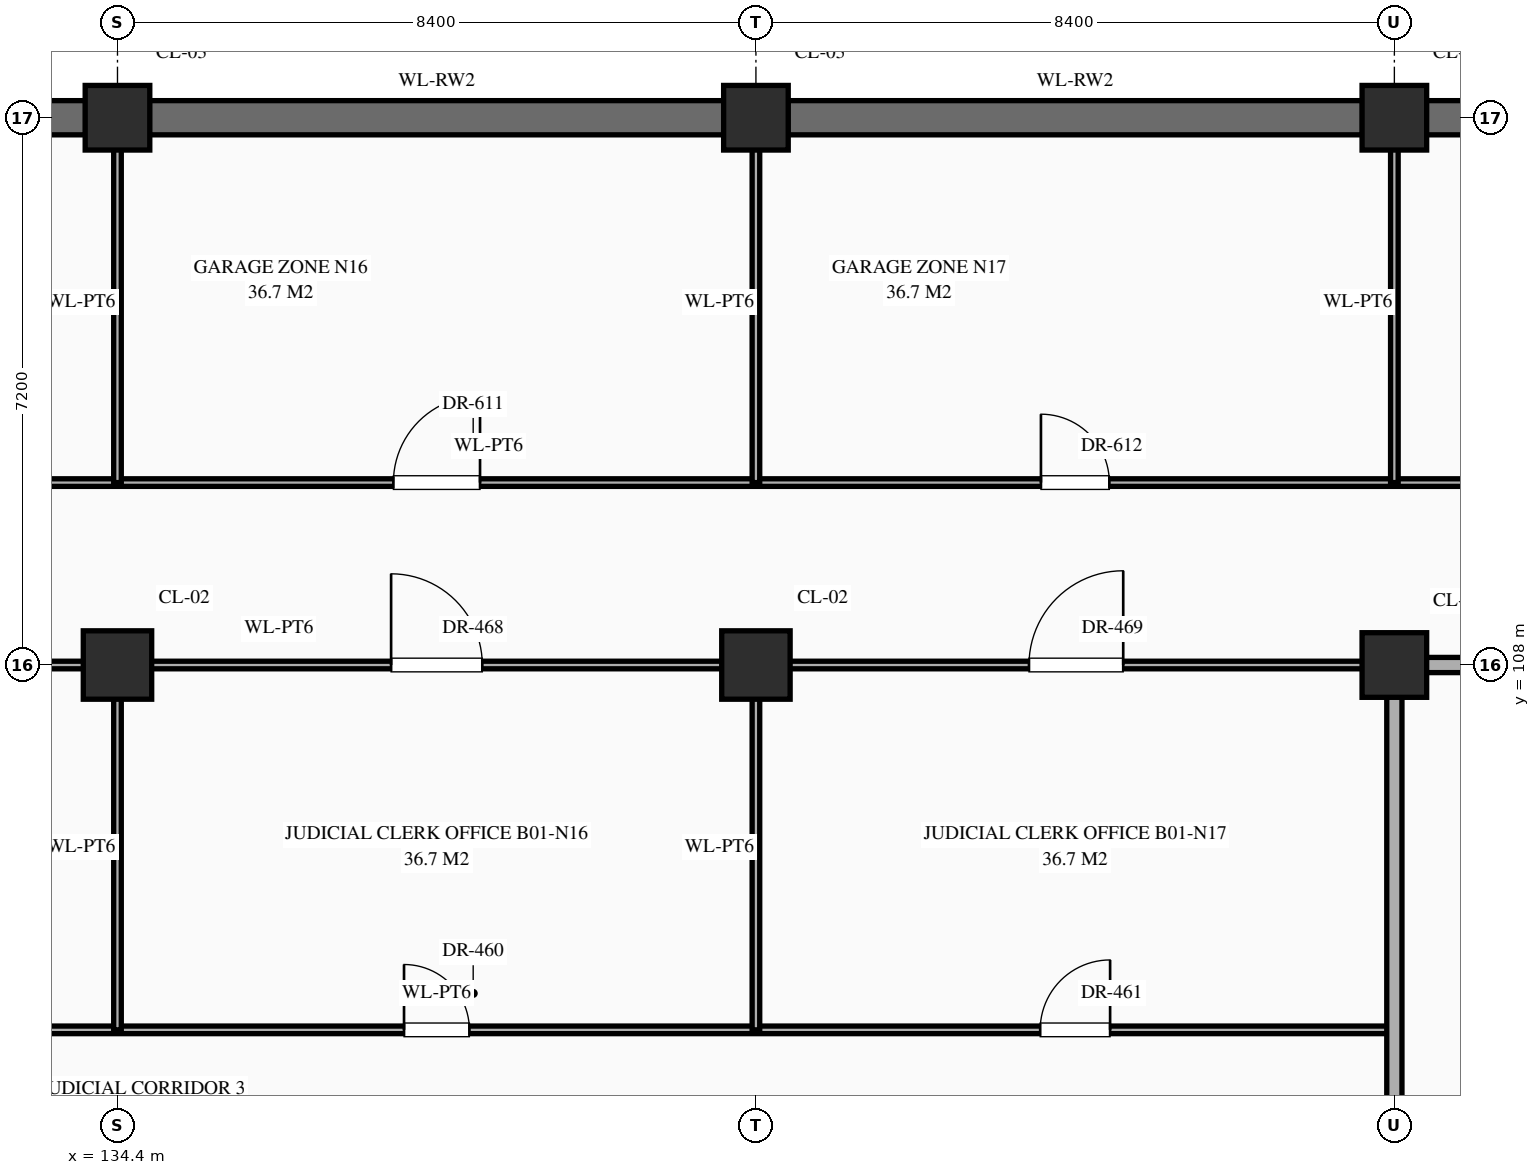
"""IFC4 building model, lengths in metres.
Left out: names, types, materials, properties, quantities, classifications, styles, units other than length and angle.
Written with IfcOpenShell. Run it as: python <this file> out.ifc"""

import sys

from ifc_helpers import new_model, si_unit, direction, frame, frame_2d, origin, origin_2d, place, context, subcontext, project, spatial, rectangle, extrude, element, fill, save


model = new_model("IFC4")
c1 = context("Model", 3, precision=1e-05, world=origin(), true_north=direction((0.0, 1.0)))
c2 = subcontext(c1, "Body", "Model", "MODEL_VIEW")
j1 = project(units=[si_unit("LENGTHUNIT", "METRE"), si_unit("PLANEANGLEUNIT", "RADIAN")], contexts=[c1])
p1 = place(None, origin())
s1 = spatial("IfcSite", under=j1, at=p1, CompositionType="ELEMENT")
p2 = place(p1, origin())
s2 = spatial("IfcBuilding", under=s1, at=p2, CompositionType="ELEMENT")
p3 = place(p2, frame((0.0, 0.0, -5.4)))
s3 = spatial("IfcBuildingStorey", under=s2, at=p3, CompositionType="ELEMENT", Elevation=-5.4)
p4 = place(p3, frame((134.4, 108.0, 0.0), z_axis=(0.0, 0.0, 1.0), x_axis=(1.0, 0.0, 0.0)))
e1 = element("IfcColumn", 1, at=p4, inside=s3, PredefinedType="COLUMN", context=c2, shape_type="SweptSolid", body=[
    extrude(rectangle(XDim=0.9, YDim=0.9, at=origin_2d()), origin(), (0.0, 0.0, 1.0), 5.4),
])
p5 = place(p3, frame((134.4, 115.2, 0.0), z_axis=(0.0, 0.0, 1.0), x_axis=(1.0, 0.0, 0.0)))
e2 = element("IfcColumn", 2, at=p5, inside=s3, PredefinedType="COLUMN", context=c2, shape_type="SweptSolid", body=[
    extrude(rectangle(XDim=0.85, YDim=0.85, at=origin_2d()), origin(), (0.0, 0.0, 1.0), 5.4),
])
p6 = place(p3, frame((142.8, 108.0, 0.0), z_axis=(0.0, 0.0, 1.0), x_axis=(1.0, 0.0, 0.0)))
e3 = element("IfcColumn", 3, at=p6, inside=s3, PredefinedType="COLUMN", context=c2, shape_type="SweptSolid", body=[
    extrude(rectangle(XDim=0.9, YDim=0.9, at=origin_2d()), origin(), (0.0, 0.0, 1.0), 5.4),
])
for number, where, z_axis, x_axis in (
    (4, (142.8, 115.2, 0.0), (0.0, 0.0, 1.0), (1.0, 0.0, 0.0)),
    (5, (151.2, 108.0, 0.0), (0.0, 0.0, 1.0), (1.0, 0.0, 0.0)),
    (6, (151.2, 115.2, 0.0), (0.0, 0.0, 1.0), (1.0, 0.0, 0.0)),
):
    element("IfcColumn", number, at=place(p3, frame(where, z_axis=z_axis, x_axis=x_axis)), inside=s3, PredefinedType="COLUMN", context=c2, shape_type="SweptSolid", body=[
        extrude(rectangle(XDim=0.85, YDim=0.85, at=origin_2d()), origin(), (0.0, 0.0, 1.0), 5.4),
    ])
p7 = place(p3, frame((126.42, 115.2, 0.0), z_axis=(0.0, 0.0, 1.0), x_axis=(1.0, 0.0, 0.0)))
e7 = element("IfcWall", 7, at=p7, inside=s3, PredefinedType="USERDEFINED", context=c2, shape_type="SweptSolid", body=[
    extrude(rectangle(XDim=7.56, YDim=0.45, at=frame_2d((3.78, 0.0))), origin(), (0.0, 0.0, 1.0), 4.98),
])
p8 = place(p3, frame((134.82, 115.2, 0.0), z_axis=(0.0, 0.0, 1.0), x_axis=(1.0, 0.0, 0.0)))
e8 = element("IfcWall", 8, at=p8, inside=s3, PredefinedType="USERDEFINED", context=c2, shape_type="SweptSolid", body=[
    extrude(rectangle(XDim=7.56, YDim=0.45, at=frame_2d((3.78, 0.0))), origin(), (0.0, 0.0, 1.0), 4.98),
])
p9 = place(p3, frame((143.22, 115.2, 0.0), z_axis=(0.0, 0.0, 1.0), x_axis=(1.0, 0.0, 0.0)))
e9 = element("IfcWall", 9, at=p9, inside=s3, PredefinedType="USERDEFINED", context=c2, shape_type="SweptSolid", body=[
    extrude(rectangle(XDim=7.56, YDim=0.45, at=frame_2d((3.78, 0.0))), origin(), (0.0, 0.0, 1.0), 4.98),
])
p10 = place(p3, frame((151.62, 115.2, 0.0), z_axis=(0.0, 0.0, 1.0), x_axis=(1.0, 0.0, 0.0)))
e10 = element("IfcWall", 10, at=p10, inside=s3, PredefinedType="USERDEFINED", context=c2, shape_type="SweptSolid", body=[
    extrude(rectangle(XDim=7.56, YDim=0.45, at=frame_2d((3.78, 0.0))), origin(), (0.0, 0.0, 1.0), 4.98),
])
p11 = place(p3, frame((126.0, 103.2, 0.0), z_axis=(0.0, 0.0, 1.0), x_axis=(1.0, 0.0, 0.0)))
e11 = element("IfcWall", 11, at=p11, inside=s3, PredefinedType="STANDARD", context=c2, shape_type="SweptSolid", body=[
    extrude(rectangle(XDim=25.2, YDim=0.1, at=frame_2d((12.6, 0.0))), origin(), (0.0, 0.0, 1.0), 5.1),
])
p12 = place(p11, frame((3.75, 0.0, 0.0)))
e12 = element("IfcOpeningElement", 12, at=p12, cuts=e11, PredefinedType="OPENING", context=c2, shape_type="SweptSolid", body=[
    extrude(rectangle(XDim=0.9, YDim=2.15, at=frame_2d((0.45, 1.075))), frame((0.0, 0.062, 0.0), z_axis=(0.0, -1.0, 0.0), x_axis=(1.0, 0.0, 0.0)), (0.0, 0.0, 1.0), 0.124),
])
p13 = place(p11, frame((12.17, 0.0, 0.0)))
e13 = element("IfcOpeningElement", 13, at=p13, cuts=e11, PredefinedType="OPENING", context=c2, shape_type="SweptSolid", body=[
    extrude(rectangle(XDim=0.86, YDim=2.1, at=frame_2d((0.43, 1.05))), frame((0.0, 0.062, 0.0), z_axis=(0.0, -1.0, 0.0), x_axis=(1.0, 0.0, 0.0)), (0.0, 0.0, 1.0), 0.124),
])
p14 = place(p11, frame((20.54, 0.0, 0.0)))
e14 = element("IfcOpeningElement", 14, at=p14, cuts=e11, PredefinedType="OPENING", context=c2, shape_type="SweptSolid", body=[
    extrude(rectangle(XDim=0.92, YDim=2.15, at=frame_2d((0.46, 1.075))), frame((0.0, 0.062, 0.0), z_axis=(0.0, -1.0, 0.0), x_axis=(1.0, 0.0, 0.0)), (0.0, 0.0, 1.0), 0.124),
])
p15 = place(p3, frame((126.0, 108.0, 0.0), z_axis=(0.0, 0.0, 1.0), x_axis=(1.0, 0.0, 0.0)))
e15 = element("IfcWall", 15, at=p15, inside=s3, PredefinedType="STANDARD", context=c2, shape_type="SweptSolid", body=[
    extrude(rectangle(XDim=25.2, YDim=0.1, at=frame_2d((12.6, 0.0))), origin(), (0.0, 0.0, 1.0), 4.13),
])
p16 = place(p15, frame((3.62, 0.0, 0.0)))
e16 = element("IfcOpeningElement", 16, at=p16, cuts=e15, PredefinedType="OPENING", context=c2, shape_type="SweptSolid", body=[
    extrude(rectangle(XDim=1.16, YDim=2.3, at=frame_2d((0.58, 1.15))), frame((0.0, 0.062, 0.0), z_axis=(0.0, -1.0, 0.0), x_axis=(1.0, 0.0, 0.0)), (0.0, 0.0, 1.0), 0.124),
])
p17 = place(p15, frame((12.0, 0.0, 0.0)))
e17 = element("IfcOpeningElement", 17, at=p17, cuts=e15, PredefinedType="OPENING", context=c2, shape_type="SweptSolid", body=[
    extrude(rectangle(XDim=1.2, YDim=2.35, at=frame_2d((0.6, 1.175))), frame((0.0, 0.062, 0.0), z_axis=(0.0, -1.0, 0.0), x_axis=(1.0, 0.0, 0.0)), (0.0, 0.0, 1.0), 0.124),
])
p18 = place(p15, frame((20.393, 0.0, 0.0)))
e18 = element("IfcOpeningElement", 18, at=p18, cuts=e15, PredefinedType="OPENING", context=c2, shape_type="SweptSolid", body=[
    extrude(rectangle(XDim=1.24, YDim=2.3, at=frame_2d((0.62, 1.15))), frame((0.0, 0.062, 0.0), z_axis=(0.0, -1.0, 0.0), x_axis=(1.0, 0.0, 0.0)), (0.0, 0.0, 1.0), 0.124),
])
p19 = place(p3, frame((151.2, 108.0, 0.0), z_axis=(0.0, 0.0, 1.0), x_axis=(1.0, 0.0, 0.0)))
e19 = element("IfcWall", 19, at=p19, inside=s3, PredefinedType="STANDARD", context=c2, shape_type="SweptSolid", body=[
    extrude(rectangle(XDim=6.6, YDim=0.2, at=frame_2d((3.3, 0.0))), origin(), (0.0, 0.0, 1.0), 4.13),
])
p20 = place(p3, frame((0.04, 110.4, 0.0), z_axis=(0.0, 0.0, 1.0), x_axis=(1.0, 0.0, 0.0)))
e20 = element("IfcWall", 20, at=p20, inside=s3, PredefinedType="STANDARD", context=c2, shape_type="SweptSolid", body=[
    extrude(rectangle(XDim=167.92, YDim=0.1, at=frame_2d((83.96, 0.0))), origin(), (0.0, 0.0, 1.0), 5.1),
])
p21 = place(p20, frame((3.65, 0.0, 0.0)))
e21 = element("IfcOpeningElement", 21, at=p21, cuts=e20, PredefinedType="OPENING", context=c2, shape_type="SweptSolid", body=[
    extrude(rectangle(XDim=1.06, YDim=2.4, at=frame_2d((0.53, 1.2))), frame((0.0, 0.062, 0.0), z_axis=(0.0, -1.0, 0.0), x_axis=(1.0, 0.0, 0.0)), (0.0, 0.0, 1.0), 0.124),
])
p22 = place(p20, frame((11.99, 0.0, 0.0)))
e22 = element("IfcOpeningElement", 22, at=p22, cuts=e20, PredefinedType="OPENING", context=c2, shape_type="SweptSolid", body=[
    extrude(rectangle(XDim=1.14, YDim=2.4, at=frame_2d((0.57, 1.2))), frame((0.0, 0.062, 0.0), z_axis=(0.0, -1.0, 0.0), x_axis=(1.0, 0.0, 0.0)), (0.0, 0.0, 1.0), 0.124),
])
p23 = place(p20, frame((20.51, 0.0, 0.0)))
e23 = element("IfcOpeningElement", 23, at=p23, cuts=e20, PredefinedType="OPENING", context=c2, shape_type="SweptSolid", body=[
    extrude(rectangle(XDim=0.9, YDim=2.15, at=frame_2d((0.45, 1.075))), frame((0.0, 0.062, 0.0), z_axis=(0.0, -1.0, 0.0), x_axis=(1.0, 0.0, 0.0)), (0.0, 0.0, 1.0), 0.124),
])
p24 = place(p20, frame((28.93, 0.0, 0.0)))
e24 = element("IfcOpeningElement", 24, at=p24, cuts=e20, PredefinedType="OPENING", context=c2, shape_type="SweptSolid", body=[
    extrude(rectangle(XDim=0.86, YDim=2.1, at=frame_2d((0.43, 1.05))), frame((0.0, 0.062, 0.0), z_axis=(0.0, -1.0, 0.0), x_axis=(1.0, 0.0, 0.0)), (0.0, 0.0, 1.0), 0.124),
])
p25 = place(p20, frame((37.3, 0.0, 0.0)))
e25 = element("IfcOpeningElement", 25, at=p25, cuts=e20, PredefinedType="OPENING", context=c2, shape_type="SweptSolid", body=[
    extrude(rectangle(XDim=0.92, YDim=2.15, at=frame_2d((0.46, 1.075))), frame((0.0, 0.062, 0.0), z_axis=(0.0, -1.0, 0.0), x_axis=(1.0, 0.0, 0.0)), (0.0, 0.0, 1.0), 0.124),
])
p26 = place(p20, frame((45.68, 0.0, 0.0)))
e26 = element("IfcOpeningElement", 26, at=p26, cuts=e20, PredefinedType="OPENING", context=c2, shape_type="SweptSolid", body=[
    extrude(rectangle(XDim=0.96, YDim=2.2, at=frame_2d((0.48, 1.1))), frame((0.0, 0.062, 0.0), z_axis=(0.0, -1.0, 0.0), x_axis=(1.0, 0.0, 0.0)), (0.0, 0.0, 1.0), 0.124),
])
p27 = place(p20, frame((54.04, 0.0, 0.0)))
e27 = element("IfcOpeningElement", 27, at=p27, cuts=e20, PredefinedType="OPENING", context=c2, shape_type="SweptSolid", body=[
    extrude(rectangle(XDim=1.04, YDim=2.2, at=frame_2d((0.52, 1.1))), frame((0.0, 0.062, 0.0), z_axis=(0.0, -1.0, 0.0), x_axis=(1.0, 0.0, 0.0)), (0.0, 0.0, 1.0), 0.124),
])
p28 = place(p20, frame((62.42, 0.0, 0.0)))
e28 = element("IfcOpeningElement", 28, at=p28, cuts=e20, PredefinedType="OPENING", context=c2, shape_type="SweptSolid", body=[
    extrude(rectangle(XDim=1.08, YDim=2.25, at=frame_2d((0.54, 1.125))), frame((0.0, 0.062, 0.0), z_axis=(0.0, -1.0, 0.0), x_axis=(1.0, 0.0, 0.0)), (0.0, 0.0, 1.0), 0.124),
])
p29 = place(p20, frame((70.8, 0.0, 0.0)))
e29 = element("IfcOpeningElement", 29, at=p29, cuts=e20, PredefinedType="OPENING", context=c2, shape_type="SweptSolid", body=[
    extrude(rectangle(XDim=1.12, YDim=2.25, at=frame_2d((0.56, 1.125))), frame((0.0, 0.062, 0.0), z_axis=(0.0, -1.0, 0.0), x_axis=(1.0, 0.0, 0.0)), (0.0, 0.0, 1.0), 0.124),
])
p30 = place(p20, frame((79.18, 0.0, 0.0)))
e30 = element("IfcOpeningElement", 30, at=p30, cuts=e20, PredefinedType="OPENING", context=c2, shape_type="SweptSolid", body=[
    extrude(rectangle(XDim=1.16, YDim=2.3, at=frame_2d((0.58, 1.15))), frame((0.0, 0.062, 0.0), z_axis=(0.0, -1.0, 0.0), x_axis=(1.0, 0.0, 0.0)), (0.0, 0.0, 1.0), 0.124),
])
p31 = place(p20, frame((87.54, 0.0, 0.0)))
e31 = element("IfcOpeningElement", 31, at=p31, cuts=e20, PredefinedType="OPENING", context=c2, shape_type="SweptSolid", body=[
    extrude(rectangle(XDim=1.24, YDim=2.3, at=frame_2d((0.62, 1.15))), frame((0.0, 0.062, 0.0), z_axis=(0.0, -1.0, 0.0), x_axis=(1.0, 0.0, 0.0)), (0.0, 0.0, 1.0), 0.124),
])
p32 = place(p20, frame((95.92, 0.0, 0.0)))
e32 = element("IfcOpeningElement", 32, at=p32, cuts=e20, PredefinedType="OPENING", context=c2, shape_type="SweptSolid", body=[
    extrude(rectangle(XDim=1.28, YDim=2.35, at=frame_2d((0.64, 1.175))), frame((0.0, 0.062, 0.0), z_axis=(0.0, -1.0, 0.0), x_axis=(1.0, 0.0, 0.0)), (0.0, 0.0, 1.0), 0.124),
])
p33 = place(p20, frame((104.49, 0.0, 0.0)))
e33 = element("IfcOpeningElement", 33, at=p33, cuts=e20, PredefinedType="OPENING", context=c2, shape_type="SweptSolid", body=[
    extrude(rectangle(XDim=0.94, YDim=2.3, at=frame_2d((0.47, 1.15))), frame((0.0, 0.062, 0.0), z_axis=(0.0, -1.0, 0.0), x_axis=(1.0, 0.0, 0.0)), (0.0, 0.0, 1.0), 0.124),
])
p34 = place(p20, frame((112.87, 0.0, 0.0)))
e34 = element("IfcOpeningElement", 34, at=p34, cuts=e20, PredefinedType="OPENING", context=c2, shape_type="SweptSolid", body=[
    extrude(rectangle(XDim=0.98, YDim=2.35, at=frame_2d((0.49, 1.175))), frame((0.0, 0.062, 0.0), z_axis=(0.0, -1.0, 0.0), x_axis=(1.0, 0.0, 0.0)), (0.0, 0.0, 1.0), 0.124),
])
p35 = place(p20, frame((121.25, 0.0, 0.0)))
e35 = element("IfcOpeningElement", 35, at=p35, cuts=e20, PredefinedType="OPENING", context=c2, shape_type="SweptSolid", body=[
    extrude(rectangle(XDim=1.02, YDim=2.4, at=frame_2d((0.51, 1.2))), frame((0.0, 0.062, 0.0), z_axis=(0.0, -1.0, 0.0), x_axis=(1.0, 0.0, 0.0)), (0.0, 0.0, 1.0), 0.124),
])
p36 = place(p20, frame((129.63, 0.0, 0.0)))
e36 = element("IfcOpeningElement", 36, at=p36, cuts=e20, PredefinedType="OPENING", context=c2, shape_type="SweptSolid", body=[
    extrude(rectangle(XDim=1.06, YDim=2.4, at=frame_2d((0.53, 1.2))), frame((0.0, 0.062, 0.0), z_axis=(0.0, -1.0, 0.0), x_axis=(1.0, 0.0, 0.0)), (0.0, 0.0, 1.0), 0.124),
])
p37 = place(p20, frame((137.99, 0.0, 0.0)))
e37 = element("IfcOpeningElement", 37, at=p37, cuts=e20, PredefinedType="OPENING", context=c2, shape_type="SweptSolid", body=[
    extrude(rectangle(XDim=1.14, YDim=2.4, at=frame_2d((0.57, 1.2))), frame((0.0, 0.062, 0.0), z_axis=(0.0, -1.0, 0.0), x_axis=(1.0, 0.0, 0.0)), (0.0, 0.0, 1.0), 0.124),
])
p38 = place(p20, frame((146.51, 0.0, 0.0)))
e38 = element("IfcOpeningElement", 38, at=p38, cuts=e20, PredefinedType="OPENING", context=c2, shape_type="SweptSolid", body=[
    extrude(rectangle(XDim=0.9, YDim=2.15, at=frame_2d((0.45, 1.075))), frame((0.0, 0.062, 0.0), z_axis=(0.0, -1.0, 0.0), x_axis=(1.0, 0.0, 0.0)), (0.0, 0.0, 1.0), 0.124),
])
p39 = place(p20, frame((154.93, 0.0, 0.0)))
e39 = element("IfcOpeningElement", 39, at=p39, cuts=e20, PredefinedType="OPENING", context=c2, shape_type="SweptSolid", body=[
    extrude(rectangle(XDim=0.86, YDim=2.1, at=frame_2d((0.43, 1.05))), frame((0.0, 0.062, 0.0), z_axis=(0.0, -1.0, 0.0), x_axis=(1.0, 0.0, 0.0)), (0.0, 0.0, 1.0), 0.124),
])
p40 = place(p20, frame((163.28, 0.0, 0.0)))
e40 = element("IfcOpeningElement", 40, at=p40, cuts=e20, PredefinedType="OPENING", context=c2, shape_type="SweptSolid", body=[
    extrude(rectangle(XDim=0.92, YDim=2.15, at=frame_2d((0.46, 1.075))), frame((0.0, 0.062, 0.0), z_axis=(0.0, -1.0, 0.0), x_axis=(1.0, 0.0, 0.0)), (0.0, 0.0, 1.0), 0.124),
])
p41 = place(p3, frame((134.4, 103.2, 0.0), z_axis=(0.0, 0.0, 1.0), x_axis=(0.0, 1.0, 0.0)))
e41 = element("IfcWall", 41, at=p41, inside=s3, PredefinedType="STANDARD", context=c2, shape_type="SweptSolid", body=[
    extrude(rectangle(XDim=4.8, YDim=0.1, at=frame_2d((2.4, 0.0))), origin(), (0.0, 0.0, 1.0), 4.35),
])
p42 = place(p3, frame((134.4, 110.4, 0.0), z_axis=(0.0, 0.0, 1.0), x_axis=(0.0, 1.0, 0.0)))
e42 = element("IfcWall", 42, at=p42, inside=s3, PredefinedType="STANDARD", context=c2, shape_type="SweptSolid", body=[
    extrude(rectangle(XDim=4.76, YDim=0.1, at=frame_2d((2.38, 0.0))), origin(), (0.0, 0.0, 1.0), 4.23),
])
p43 = place(p3, frame((142.8, 103.2, 0.0), z_axis=(0.0, 0.0, 1.0), x_axis=(0.0, 1.0, 0.0)))
e43 = element("IfcWall", 43, at=p43, inside=s3, PredefinedType="STANDARD", context=c2, shape_type="SweptSolid", body=[
    extrude(rectangle(XDim=4.8, YDim=0.1, at=frame_2d((2.4, 0.0))), origin(), (0.0, 0.0, 1.0), 4.35),
])
p44 = place(p3, frame((142.8, 110.4, 0.0), z_axis=(0.0, 0.0, 1.0), x_axis=(0.0, 1.0, 0.0)))
e44 = element("IfcWall", 44, at=p44, inside=s3, PredefinedType="STANDARD", context=c2, shape_type="SweptSolid", body=[
    extrude(rectangle(XDim=4.76, YDim=0.1, at=frame_2d((2.38, 0.0))), origin(), (0.0, 0.0, 1.0), 4.23),
])
p45 = place(p3, frame((151.2, 91.2, 0.0), z_axis=(0.0, 0.0, 1.0), x_axis=(0.0, 1.0, 0.0)))
e45 = element("IfcWall", 45, at=p45, inside=s3, PredefinedType="STANDARD", context=c2, shape_type="SweptSolid", body=[
    extrude(rectangle(XDim=16.8, YDim=0.2, at=frame_2d((8.4, 0.0))), origin(), (0.0, 0.0, 1.0), 4.35),
])
p46 = place(p3, frame((151.2, 110.4, 0.0), z_axis=(0.0, 0.0, 1.0), x_axis=(0.0, 1.0, 0.0)))
e46 = element("IfcWall", 46, at=p46, inside=s3, PredefinedType="STANDARD", context=c2, shape_type="SweptSolid", body=[
    extrude(rectangle(XDim=4.76, YDim=0.1, at=frame_2d((2.38, 0.0))), origin(), (0.0, 0.0, 1.0), 4.23),
])
p47 = place(p13, origin())
e47 = element("IfcDoor", 47, at=p47, inside=s3, OperationType="SINGLE_SWING_LEFT", PredefinedType="DOOR", context=c2, shape_type="SweptSolid", body=[
    extrude(rectangle(XDim=0.86, YDim=2.1, at=frame_2d((0.43, 1.05))), frame((0.0, 0.025, 0.0), z_axis=(0.0, -1.0, 0.0), x_axis=(1.0, 0.0, 0.0)), (0.0, 0.0, 1.0), 0.05),
])
fill(e13, e47)
p48 = place(p14, origin())
e48 = element("IfcDoor", 48, at=p48, inside=s3, OperationType="SINGLE_SWING_RIGHT", PredefinedType="DOOR", context=c2, shape_type="SweptSolid", body=[
    extrude(rectangle(XDim=0.92, YDim=2.15, at=frame_2d((0.46, 1.075))), frame((0.0, 0.025, 0.0), z_axis=(0.0, -1.0, 0.0), x_axis=(1.0, 0.0, 0.0)), (0.0, 0.0, 1.0), 0.05),
])
fill(e14, e48)
p49 = place(p17, origin())
e49 = element("IfcDoor", 49, at=p49, inside=s3, OperationType="SINGLE_SWING_LEFT", PredefinedType="DOOR", context=c2, shape_type="SweptSolid", body=[
    extrude(rectangle(XDim=1.2, YDim=2.35, at=frame_2d((0.6, 1.175))), frame((0.0, 0.025, 0.0), z_axis=(0.0, -1.0, 0.0), x_axis=(1.0, 0.0, 0.0)), (0.0, 0.0, 1.0), 0.05),
])
fill(e17, e49)
p50 = place(p18, origin())
e50 = element("IfcDoor", 50, at=p50, inside=s3, OperationType="SINGLE_SWING_RIGHT", PredefinedType="DOOR", context=c2, shape_type="SweptSolid", body=[
    extrude(rectangle(XDim=1.24, YDim=2.3, at=frame_2d((0.62, 1.15))), frame((0.0, 0.025, 0.0), z_axis=(0.0, -1.0, 0.0), x_axis=(1.0, 0.0, 0.0)), (0.0, 0.0, 1.0), 0.05),
])
fill(e18, e50)
p51 = place(p37, origin())
e51 = element("IfcDoor", 51, at=p51, inside=s3, OperationType="SINGLE_SWING_RIGHT", PredefinedType="DOOR", context=c2, shape_type="SweptSolid", body=[
    extrude(rectangle(XDim=1.14, YDim=2.4, at=frame_2d((0.57, 1.2))), frame((0.0, 0.025, 0.0), z_axis=(0.0, -1.0, 0.0), x_axis=(1.0, 0.0, 0.0)), (0.0, 0.0, 1.0), 0.05),
])
fill(e37, e51)
p52 = place(p38, origin())
e52 = element("IfcDoor", 52, at=p52, inside=s3, OperationType="SINGLE_SWING_LEFT", PredefinedType="DOOR", context=c2, shape_type="SweptSolid", body=[
    extrude(rectangle(XDim=0.9, YDim=2.15, at=frame_2d((0.45, 1.075))), frame((0.0, 0.025, 0.0), z_axis=(0.0, -1.0, 0.0), x_axis=(1.0, 0.0, 0.0)), (0.0, 0.0, 1.0), 0.05),
])
fill(e38, e52)
save(model, sys.argv[1])
